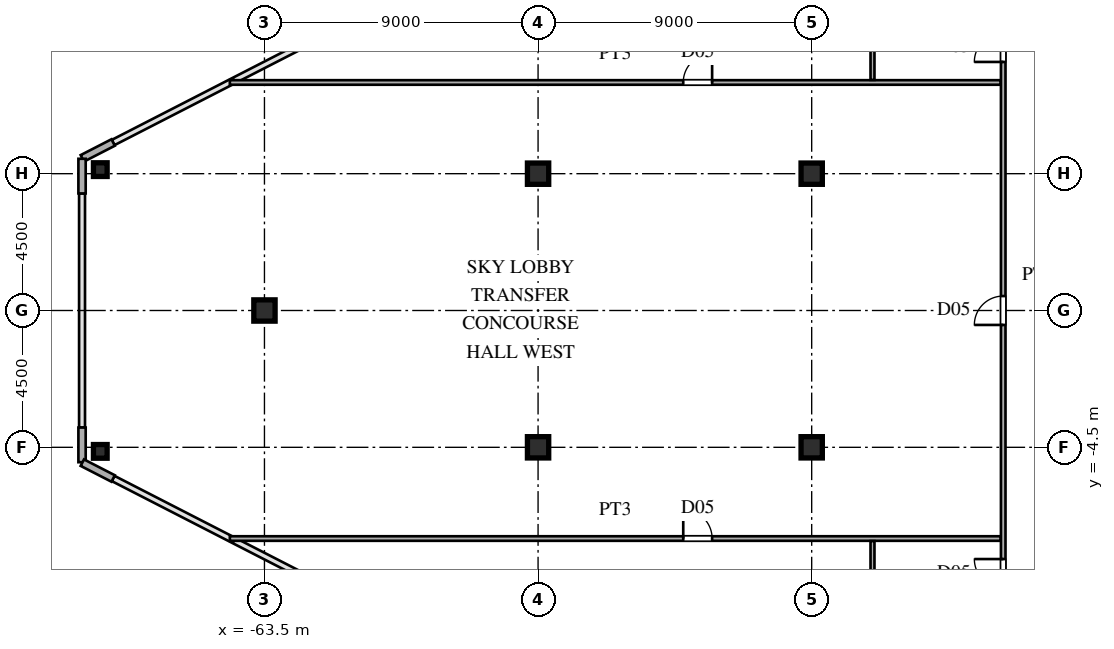
"""IFC4 building model, lengths in metres.
Left out: names, types, materials, properties, quantities, classifications, styles, units other than length and angle.
Written with IfcOpenShell. Run it as: python <this file> out.ifc"""

import sys

from ifc_helpers import new_model, si_unit, direction, frame, frame_2d, origin, origin_2d, place, context, subcontext, project, spatial, rectangle, hollow_rectangle, i_section, extrude, source, transform, mapped, element, fill, save


model = new_model("IFC4")
c1 = context("Model", 3, precision=1e-05, world=origin(), true_north=direction((0.0, 1.0)))
c2 = subcontext(c1, "Body", "Model", "MODEL_VIEW")
j1 = project(units=[si_unit("LENGTHUNIT", "METRE"), si_unit("PLANEANGLEUNIT", "RADIAN")], contexts=[c1])
p1 = place(None, origin())
s1 = spatial("IfcSite", under=j1, at=p1, CompositionType="ELEMENT")
p2 = place(p1, origin())
s2 = spatial("IfcBuilding", under=s1, at=p2, CompositionType="ELEMENT")
p3 = place(p2, frame((0.0, 0.0, 135.6)))
s3 = spatial("IfcBuildingStorey", under=s2, at=p3, CompositionType="ELEMENT", Elevation=135.6)
m1 = source(origin(), c2, "Body", "SweptSolid", [
    extrude(i_section(OverallWidth=0.7, OverallDepth=0.7, WebThickness=0.028, FlangeThickness=0.045, at=origin_2d()), origin(), (0.0, 0.0, 1.0), 4.8),
])
for number, where, z_axis, x_axis in (
    (1, (-45.5, -4.5, 0.0), (0.0, 0.0, 1.0), (1.0, 0.0, 0.0)),
    (2, (-45.5, 4.5, 0.0), (0.0, 0.0, 1.0), (1.0, 0.0, 0.0)),
    (3, (-54.5, -4.5, 0.0), (0.0, 0.0, 1.0), (1.0, 0.0, 0.0)),
    (4, (-54.5, 4.5, 0.0), (0.0, 0.0, 1.0), (1.0, 0.0, 0.0)),
    (5, (-63.5, 0.0, 0.0), (0.0, 0.0, 1.0), (1.0, 0.0, 0.0)),
):
    element("IfcColumn", number, at=place(p3, frame(where, z_axis=z_axis, x_axis=x_axis)), inside=s3, PredefinedType="COLUMN", context=c2, shape_type="MappedRepresentation", body=[
        mapped(m1, transform((0.0, 0.0, 0.0), scale=1.0)),
    ])
m2 = source(origin(), c2, "Body", "SweptSolid", [
    extrude(hollow_rectangle(XDim=0.45, YDim=0.45, WallThickness=0.018, at=origin_2d()), origin(), (0.0, 0.0, 1.0), 4.8),
])
for number, where, z_axis, x_axis in (
    (6, (-68.9, 4.634, 0.0), (0.0, 0.0, 1.0), (1.0, 0.0, 0.0)),
    (7, (-68.9, -4.634, 0.0), (0.0, 0.0, 1.0), (1.0, 0.0, 0.0)),
):
    element("IfcColumn", number, at=place(p3, frame(where, z_axis=z_axis, x_axis=x_axis)), inside=s3, PredefinedType="COLUMN", context=c2, shape_type="MappedRepresentation", body=[
        mapped(m2, transform((0.0, 0.0, 0.0), scale=1.0)),
    ])
p4 = place(p3, frame((-68.477, 5.525, 0.0), z_axis=(0.0, 0.0, 1.0), x_axis=(-0.889797395748, -0.456355776255, 0.0)))
e8 = element("IfcWall", 8, at=p4, inside=s3, PredefinedType="SOLIDWALL", context=c2, shape_type="SweptSolid", body=[
    extrude(rectangle(XDim=1.14, YDim=0.24, at=frame_2d((0.57, 0.0))), origin(), (0.0, 0.0, 1.0), 4.58),
])
for number, where, z_axis, x_axis in (
    (9, (-69.5, 4.99, 0.0), (0.0, 0.0, 1.0), (0.0, -1.0, 0.0)),
    (10, (-69.5, -3.85, 0.0), (0.0, 0.0, 1.0), (0.0, -1.0, 0.0)),
):
    element("IfcWall", number, at=place(p3, frame(where, z_axis=z_axis, x_axis=x_axis)), inside=s3, PredefinedType="SOLIDWALL", context=c2, shape_type="SweptSolid", body=[
        extrude(rectangle(XDim=1.14, YDim=0.24, at=frame_2d((0.57, 0.0))), origin(), (0.0, 0.0, 1.0), 4.58),
    ])
p5 = place(p3, frame((-69.491, -5.005, 0.0), z_axis=(0.0, 0.0, 1.0), x_axis=(0.889797395748, -0.456355776255, 0.0)))
e11 = element("IfcWall", 11, at=p5, inside=s3, PredefinedType="SOLIDWALL", context=c2, shape_type="SweptSolid", body=[
    extrude(rectangle(XDim=1.14, YDim=0.24, at=frame_2d((0.57, 0.0))), origin(), (0.0, 0.0, 1.0), 4.58),
])
p6 = place(p3, frame((-64.639, -7.5, 0.0), z_axis=(0.0, 0.0, 1.0), x_axis=(1.0, 0.0, 0.0)))
e12 = element("IfcWall", 12, at=p6, inside=s3, PredefinedType="PARTITIONING", context=c2, shape_type="SweptSolid", body=[
    extrude(rectangle(XDim=25.354, YDim=0.15, at=frame_2d((12.677, 0.0))), origin(), (0.0, 0.0, 1.0), 4.58),
])
p7 = place(p6, frame((14.914, 0.0, 0.0)))
e13 = element("IfcOpeningElement", 13, at=p7, cuts=e12, PredefinedType="OPENING", context=c2, shape_type="SweptSolid", body=[
    extrude(rectangle(XDim=0.95, YDim=2.15, at=frame_2d((0.475, 1.075))), frame((0.0, 0.085, 0.0), z_axis=(0.0, -1.0, 0.0), x_axis=(1.0, 0.0, 0.0)), (0.0, 0.0, 1.0), 0.17),
])
p8 = place(p3, frame((-64.639, 7.5, 0.0), z_axis=(0.0, 0.0, 1.0), x_axis=(1.0, 0.0, 0.0)))
e14 = element("IfcWall", 14, at=p8, inside=s3, PredefinedType="PARTITIONING", context=c2, shape_type="SweptSolid", body=[
    extrude(rectangle(XDim=25.354, YDim=0.15, at=frame_2d((12.677, 0.0))), origin(), (0.0, 0.0, 1.0), 4.58),
])
p9 = place(p8, frame((14.914, 0.0, 0.0)))
e15 = element("IfcOpeningElement", 15, at=p9, cuts=e14, PredefinedType="OPENING", context=c2, shape_type="SweptSolid", body=[
    extrude(rectangle(XDim=0.95, YDim=2.15, at=frame_2d((0.475, 1.075))), frame((0.0, 0.085, 0.0), z_axis=(0.0, -1.0, 0.0), x_axis=(1.0, 0.0, 0.0)), (0.0, 0.0, 1.0), 0.17),
])
for number, where, z_axis, x_axis in (
    (16, (-43.5, -13.415, 0.0), (0.0, 0.0, 1.0), (0.0, 1.0, 0.0)),
    (17, (-43.5, 7.585, 0.0), (0.0, 0.0, 1.0), (0.0, 1.0, 0.0)),
):
    element("IfcWall", number, at=place(p3, frame(where, z_axis=z_axis, x_axis=x_axis)), inside=s3, PredefinedType="PARTITIONING", context=c2, shape_type="SweptSolid", body=[
        extrude(rectangle(XDim=5.83, YDim=0.13, at=frame_2d((2.915, 0.0))), origin(), (0.0, 0.0, 1.0), 4.58),
    ])
p10 = place(p3, frame((-39.2, -13.415, 0.0), z_axis=(0.0, 0.0, 1.0), x_axis=(0.0, 1.0, 0.0)))
e18 = element("IfcWall", 18, at=p10, inside=s3, PredefinedType="PARTITIONING", context=c2, shape_type="SweptSolid", body=[
    extrude(rectangle(XDim=26.83, YDim=0.15, at=frame_2d((13.415, 0.0))), origin(), (0.0, 0.0, 1.0), 4.58),
])
p11 = place(p10, frame((12.94, 0.0, 0.0)))
e19 = element("IfcOpeningElement", 19, at=p11, cuts=e18, PredefinedType="OPENING", context=c2, shape_type="SweptSolid", body=[
    extrude(rectangle(XDim=0.95, YDim=2.15, at=frame_2d((0.475, 1.075))), frame((0.0, 0.085, 0.0), z_axis=(0.0, -1.0, 0.0), x_axis=(1.0, 0.0, 0.0)), (0.0, 0.0, 1.0), 0.17),
])
p12 = place(p10, frame((1.325, 0.0, 0.0)))
e20 = element("IfcOpeningElement", 20, at=p12, cuts=e18, PredefinedType="OPENING", context=c2, shape_type="SweptSolid", body=[
    extrude(rectangle(XDim=0.88, YDim=2.1, at=frame_2d((0.44, 1.05))), frame((0.0, 0.085, 0.0), z_axis=(0.0, -1.0, 0.0), x_axis=(1.0, 0.0, 0.0)), (0.0, 0.0, 1.0), 0.17),
])
p13 = place(p10, frame((4.29, 0.0, 0.0)))
e21 = element("IfcOpeningElement", 21, at=p13, cuts=e18, PredefinedType="OPENING", context=c2, shape_type="SweptSolid", body=[
    extrude(rectangle(XDim=0.95, YDim=2.15, at=frame_2d((0.475, 1.075))), frame((0.0, 0.085, 0.0), z_axis=(0.0, -1.0, 0.0), x_axis=(1.0, 0.0, 0.0)), (0.0, 0.0, 1.0), 0.17),
])
p14 = place(p10, frame((21.59, 0.0, 0.0)))
e22 = element("IfcOpeningElement", 22, at=p14, cuts=e18, PredefinedType="OPENING", context=c2, shape_type="SweptSolid", body=[
    extrude(rectangle(XDim=0.95, YDim=2.15, at=frame_2d((0.475, 1.075))), frame((0.0, 0.085, 0.0), z_axis=(0.0, -1.0, 0.0), x_axis=(1.0, 0.0, 0.0)), (0.0, 0.0, 1.0), 0.17),
])
p15 = place(p10, frame((24.625, 0.0, 0.0)))
e23 = element("IfcOpeningElement", 23, at=p15, cuts=e18, PredefinedType="OPENING", context=c2, shape_type="SweptSolid", body=[
    extrude(rectangle(XDim=0.88, YDim=2.1, at=frame_2d((0.44, 1.05))), frame((0.0, 0.085, 0.0), z_axis=(0.0, -1.0, 0.0), x_axis=(1.0, 0.0, 0.0)), (0.0, 0.0, 1.0), 0.17),
])
m3 = source(origin(), c2, "Body", "SweptSolid", [
    extrude(rectangle(XDim=0.95, YDim=2.15, at=frame_2d((0.475, 1.075))), frame((0.0, 0.025, 0.0), z_axis=(0.0, -1.0, 0.0), x_axis=(1.0, 0.0, 0.0)), (0.0, 0.0, 1.0), 0.05),
])
p16 = place(p7, origin())
e24 = element("IfcDoor", 24, at=p16, inside=s3, OperationType="SINGLE_SWING_LEFT", PredefinedType="DOOR", context=c2, shape_type="MappedRepresentation", body=[
    mapped(m3, transform((0.0, 0.0, 0.0), scale=1.0)),
])
fill(e13, e24)
p17 = place(p9, origin())
e25 = element("IfcDoor", 25, at=p17, inside=s3, OperationType="SINGLE_SWING_RIGHT", PredefinedType="DOOR", context=c2, shape_type="MappedRepresentation", body=[
    mapped(m3, transform((0.0, 0.0, 0.0), scale=1.0)),
])
fill(e15, e25)
p18 = place(p11, origin())
e26 = element("IfcDoor", 26, at=p18, inside=s3, OperationType="SINGLE_SWING_LEFT", PredefinedType="DOOR", context=c2, shape_type="MappedRepresentation", body=[
    mapped(m3, transform((0.0, 0.0, 0.0), scale=1.0)),
])
fill(e19, e26)
p19 = place(p13, origin())
e27 = element("IfcDoor", 27, at=p19, inside=s3, OperationType="SINGLE_SWING_RIGHT", PredefinedType="DOOR", context=c2, shape_type="MappedRepresentation", body=[
    mapped(m3, transform((0.0, 0.0, 0.0), scale=1.0)),
])
fill(e21, e27)
p20 = place(p14, origin())
e28 = element("IfcDoor", 28, at=p20, inside=s3, OperationType="SINGLE_SWING_LEFT", PredefinedType="DOOR", context=c2, shape_type="MappedRepresentation", body=[
    mapped(m3, transform((0.0, 0.0, 0.0), scale=1.0)),
])
fill(e22, e28)
save(model, sys.argv[1])
